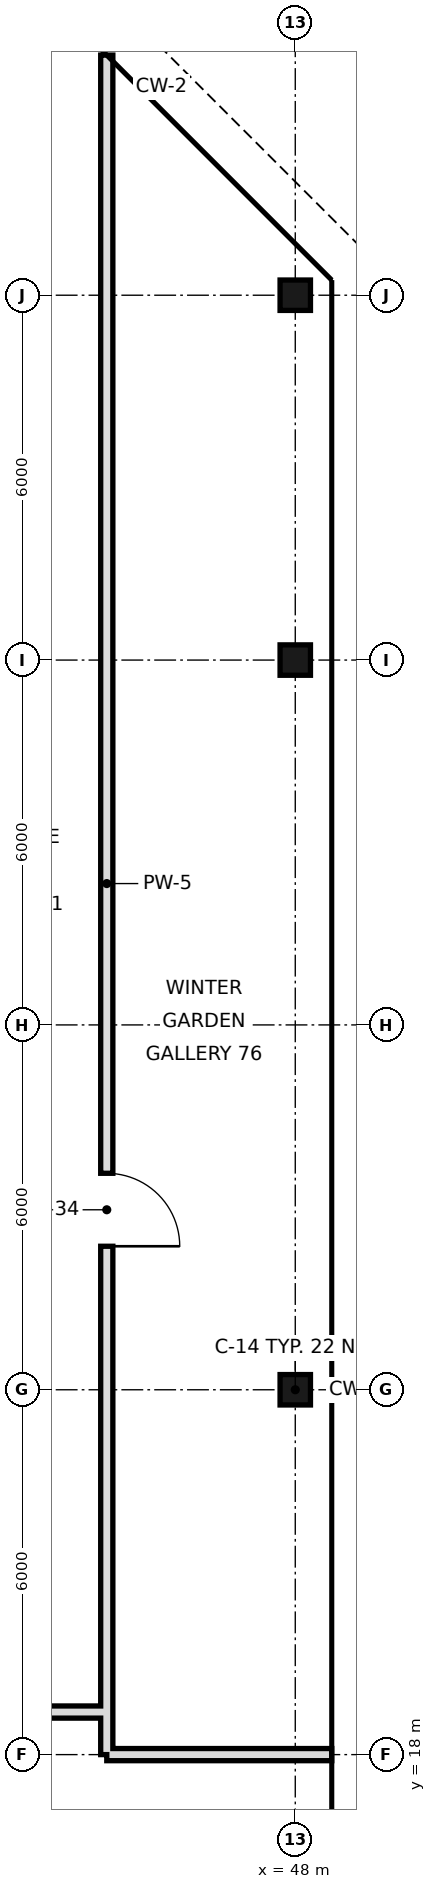
"""IFC4 building model, lengths in metres.
Left out: names, types, materials, properties, quantities, classifications, styles, units other than length and angle.
Written with IfcOpenShell. Run it as: python <this file> out.ifc"""

import sys

from ifc_helpers import new_model, si_unit, direction, frame, frame_2d, origin, origin_2d, place, context, subcontext, project, spatial, rectangle, hollow_rectangle, extrude, element, fill, save


model = new_model("IFC4")
c1 = context("Model", 3, precision=1e-05, world=origin(), true_north=direction((0.0, 1.0)))
c2 = subcontext(c1, "Body", "Model", "MODEL_VIEW")
j1 = project(units=[si_unit("LENGTHUNIT", "METRE"), si_unit("PLANEANGLEUNIT", "RADIAN")], contexts=[c1])
p1 = place(None, origin())
s1 = spatial("IfcSite", under=j1, at=p1, CompositionType="ELEMENT")
p2 = place(p1, origin())
s2 = spatial("IfcBuilding", under=s1, at=p2, CompositionType="ELEMENT")
p3 = place(p2, frame((0.0, 0.0, 319.6)))
s3 = spatial("IfcBuildingStorey", under=s2, at=p3, CompositionType="ELEMENT", Elevation=319.6)
for number, where, z_axis, x_axis in (
    (1, (48.0, 24.0, 0.0), (0.0, 0.0, 1.0), (1.0, 0.0, 0.0)),
    (2, (48.0, 36.0, 0.0), (0.0, 0.0, 1.0), (1.0, 0.0, 0.0)),
    (3, (48.0, 42.0, 0.0), (0.0, 0.0, 1.0), (1.0, 0.0, 0.0)),
):
    element("IfcColumn", number, at=place(p3, frame(where, z_axis=z_axis, x_axis=x_axis)), inside=s3, PredefinedType="COLUMN", context=c2, shape_type="SweptSolid", body=[
        extrude(hollow_rectangle(XDim=0.5, YDim=0.5, WallThickness=0.025, at=origin_2d()), origin(), (0.0, 0.0, 1.0), 3.6),
    ])
p4 = place(p3, frame((44.9, 18.7, 0.0), z_axis=(0.0, 0.0, 1.0), x_axis=(0.0, 1.0, 0.0)))
e4 = element("IfcWall", 4, at=p4, inside=s3, PredefinedType="SOLIDWALL", context=c2, shape_type="SweptSolid", body=[
    extrude(rectangle(XDim=27.249, YDim=0.2, at=frame_2d((13.625, 0.0))), origin(), (0.0, 0.0, 1.0), 2.97),
])
p5 = place(p4, frame((7.66, 0.0, 0.0)))
e5 = element("IfcOpeningElement", 5, at=p5, cuts=e4, PredefinedType="OPENING", context=c2, shape_type="SweptSolid", body=[
    extrude(rectangle(XDim=1.2, YDim=2.4, at=frame_2d((0.6, 1.2))), frame((0.0, 0.11, 0.0), z_axis=(0.0, -1.0, 0.0), x_axis=(1.0, 0.0, 0.0)), (0.0, 0.0, 1.0), 0.22),
])
p6 = place(p3, frame((44.9, 18.0, 0.0), z_axis=(0.0, 0.0, 1.0), x_axis=(0.0, 1.0, 0.0)))
e6 = element("IfcWall", 6, at=p6, inside=s3, PredefinedType="SOLIDWALL", context=c2, shape_type="SweptSolid", body=[
    extrude(rectangle(XDim=0.7, YDim=0.2, at=frame_2d((0.35, 0.0))), origin(), (0.0, 0.0, 1.0), 2.97),
])
p7 = place(p3, frame((44.9, 18.0, 0.0), z_axis=(0.0, 0.0, 1.0), x_axis=(1.0, 0.0, 0.0)))
e7 = element("IfcWall", 7, at=p7, inside=s3, PredefinedType="SOLIDWALL", context=c2, shape_type="SweptSolid", body=[
    extrude(rectangle(XDim=3.7, YDim=0.2, at=frame_2d((1.85, 0.0))), origin(), (0.0, 0.0, 1.0), 2.72),
])
p8 = place(p3, frame((43.8, 18.7, 0.0), z_axis=(0.0, 0.0, 1.0), x_axis=(1.0, 0.0, 0.0)))
e8 = element("IfcWall", 8, at=p8, inside=s3, PredefinedType="SOLIDWALL", context=c2, shape_type="SweptSolid", body=[
    extrude(rectangle(XDim=1.1, YDim=0.2, at=frame_2d((0.55, 0.0))), origin(), (0.0, 0.0, 1.0), 3.42),
])
p9 = place(p5, frame((1.2, 0.0, 0.0), z_axis=(0.0, 0.0, 1.0), x_axis=(-1.0, 0.0, 0.0)))
e9 = element("IfcDoor", 9, at=p9, inside=s3, OperationType="SINGLE_SWING_RIGHT", PredefinedType="DOOR", context=c2, shape_type="SweptSolid", body=[
    extrude(rectangle(XDim=1.2, YDim=2.4, at=frame_2d((0.6, 1.2))), frame((0.0, 0.025, 0.0), z_axis=(0.0, -1.0, 0.0), x_axis=(1.0, 0.0, 0.0)), (0.0, 0.0, 1.0), 0.05),
])
fill(e5, e9)
save(model, sys.argv[1])
